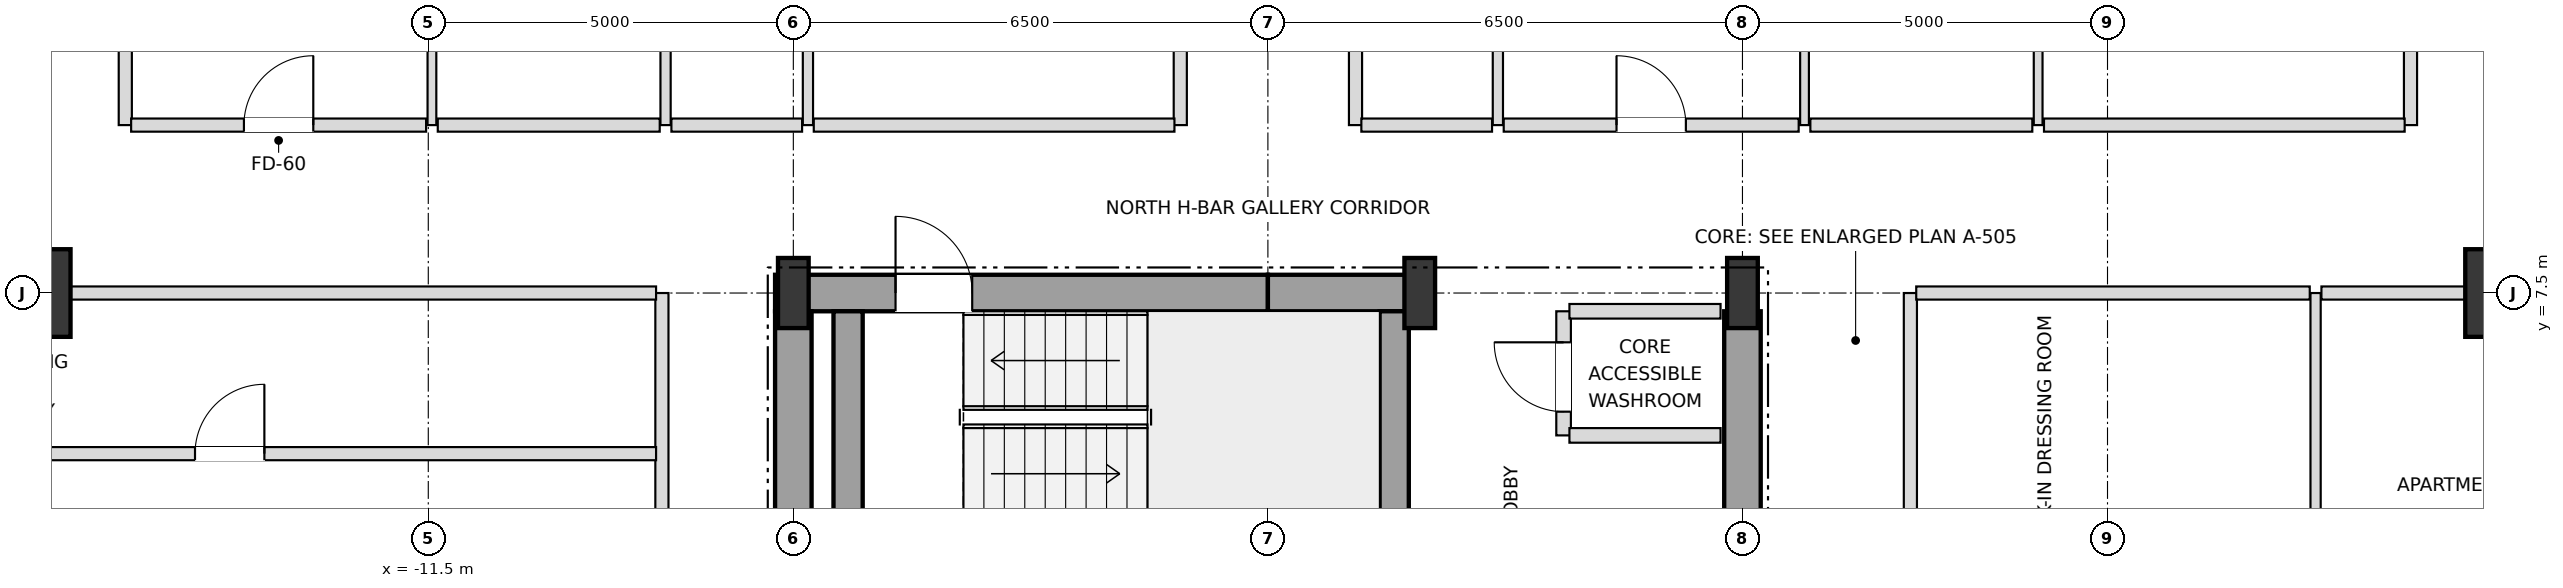
"""IFC4 building model, lengths in metres.
Left out: names, types, materials, properties, quantities, classifications, styles, units other than length and angle.
Written with IfcOpenShell. Run it as: python <this file> out.ifc"""

import sys

from ifc_helpers import new_model, si_unit, direction, frame, frame_2d, origin, origin_2d, place, context, subcontext, project, spatial, rectangle, i_section, extrude, element, fill, save


model = new_model("IFC4")
c1 = context("Model", 3, precision=1e-05, world=origin(), true_north=direction((0.0, 1.0)))
c2 = subcontext(c1, "Body", "Model", "MODEL_VIEW")
j1 = project(units=[si_unit("LENGTHUNIT", "METRE"), si_unit("PLANEANGLEUNIT", "RADIAN")], contexts=[c1])
p1 = place(None, origin())
s1 = spatial("IfcSite", under=j1, at=p1, CompositionType="ELEMENT")
p2 = place(p1, origin())
s2 = spatial("IfcBuilding", under=s1, at=p2, CompositionType="ELEMENT")
p3 = place(p2, frame((0.0, 0.0, 147.6)))
s3 = spatial("IfcBuildingStorey", under=s2, at=p3, CompositionType="ELEMENT", Elevation=147.6)
for number, where, z_axis, x_axis in (
    (1, (-6.5, 7.5, 0.0), (0.0, 0.0, 1.0), (1.0, 0.0, 0.0)),
    (2, (2.08, 7.5, 0.0), (0.0, 0.0, 1.0), (1.0, 0.0, 0.0)),
    (3, (6.5, 7.5, 0.0), (0.0, 0.0, 1.0), (1.0, 0.0, 0.0)),
):
    element("IfcColumn", number, at=place(p3, frame(where, z_axis=z_axis, x_axis=x_axis)), inside=s3, PredefinedType="COLUMN", context=c2, shape_type="SweptSolid", body=[
        extrude(i_section(OverallWidth=0.42, OverallDepth=0.96, WebThickness=0.022, FlangeThickness=0.034, at=origin_2d()), origin(), (0.0, 0.0, 1.0), 3.6),
    ])
for number, where, z_axis, x_axis in (
    (4, (17.0, 7.5, 0.0), (0.0, 0.0, 1.0), (1.0, 0.0, 0.0)),
    (5, (-17.0, 7.5, 0.0), (0.0, 0.0, 1.0), (1.0, 0.0, 0.0)),
):
    element("IfcColumn", number, at=place(p3, frame(where, z_axis=z_axis, x_axis=x_axis)), inside=s3, PredefinedType="USERDEFINED", context=c2, shape_type="SweptSolid", body=[
        extrude(rectangle(XDim=1.2, YDim=1.2, at=origin_2d()), origin(), (0.0, 0.0, 1.0), 3.6),
    ])
p4 = place(p3, frame((-6.75, 7.5, 0.0), z_axis=(0.0, 0.0, 1.0), x_axis=(1.0, 0.0, 0.0)))
e6 = element("IfcWall", 6, at=p4, inside=s3, PredefinedType="SHEAR", context=c2, shape_type="SweptSolid", body=[
    extrude(rectangle(XDim=6.75, YDim=0.5, at=frame_2d((3.375, 0.0))), origin(), (0.0, 0.0, 1.0), 3.38),
])
p5 = place(p4, frame((1.65, 0.0, 0.0)))
e7 = element("IfcOpeningElement", 7, at=p5, cuts=e6, PredefinedType="OPENING", context=c2, shape_type="SweptSolid", body=[
    extrude(rectangle(XDim=1.05, YDim=2.15, at=frame_2d((0.525, 1.075))), frame((0.0, 0.26, 0.0), z_axis=(0.0, -1.0, 0.0), x_axis=(1.0, 0.0, 0.0)), (0.0, 0.0, 1.0), 0.52),
])
p6 = place(p3, frame((0.0, 7.5, 0.0), z_axis=(0.0, 0.0, 1.0), x_axis=(1.0, 0.0, 0.0)))
e8 = element("IfcWall", 8, at=p6, inside=s3, PredefinedType="SHEAR", context=c2, shape_type="SweptSolid", body=[
    extrude(rectangle(XDim=2.08, YDim=0.5, at=frame_2d((1.04, 0.0))), origin(), (0.0, 0.0, 1.0), 3.38),
])
for number, where, z_axis, x_axis in (
    (9, (-6.5, 3.95, 0.0), (0.0, 0.0, 1.0), (0.0, 1.0, 0.0)),
    (10, (6.5, 3.95, 0.0), (0.0, 0.0, 1.0), (0.0, 1.0, 0.0)),
):
    element("IfcWall", number, at=place(p3, frame(where, z_axis=z_axis, x_axis=x_axis)), inside=s3, PredefinedType="SHEAR", context=c2, shape_type="SweptSolid", body=[
        extrude(rectangle(XDim=3.3, YDim=0.5, at=frame_2d((1.65, 0.0))), origin(), (0.0, 0.0, 1.0), 3.38),
    ])
for number, where, z_axis, x_axis in (
    (11, (1.73, 3.95, 0.0), (0.0, 0.0, 1.0), (0.0, 1.0, 0.0)),
    (12, (-5.75, 3.95, 0.0), (0.0, 0.0, 1.0), (0.0, 1.0, 0.0)),
):
    element("IfcWall", number, at=place(p3, frame(where, z_axis=z_axis, x_axis=x_axis)), inside=s3, PredefinedType="SHEAR", context=c2, shape_type="SweptSolid", body=[
        extrude(rectangle(XDim=3.3, YDim=0.4, at=frame_2d((1.65, 0.0))), origin(), (0.0, 0.0, 1.0), 3.38),
    ])
p7 = place(p3, frame((-15.65, 9.8, 0.0), z_axis=(0.0, 0.0, 1.0), x_axis=(0.0, 1.0, 0.0)))
e13 = element("IfcWall", 13, at=p7, inside=s3, PredefinedType="PARTITIONING", context=c2, shape_type="SweptSolid", body=[
    extrude(rectangle(XDim=7.35, YDim=0.18, at=frame_2d((3.675, 0.0))), origin(), (0.0, 0.0, 1.0), 2.736),
])
p8 = place(p3, frame((-11.45, 9.8, 0.0), z_axis=(0.0, 0.0, 1.0), x_axis=(0.0, 1.0, 0.0)))
e14 = element("IfcWall", 14, at=p8, inside=s3, PredefinedType="PARTITIONING", context=c2, shape_type="SweptSolid", body=[
    extrude(rectangle(XDim=7.35, YDim=0.12, at=frame_2d((3.675, 0.0))), origin(), (0.0, 0.0, 1.0), 2.736),
])
p9 = place(p8, frame((3.713, 0.0, 0.0)))
e15 = element("IfcOpeningElement", 15, at=p9, cuts=e14, PredefinedType="OPENING", context=c2, shape_type="SweptSolid", body=[
    extrude(rectangle(XDim=0.95, YDim=2.1, at=frame_2d((0.475, 1.05))), frame((0.0, 0.07, 0.0), z_axis=(0.0, -1.0, 0.0), x_axis=(1.0, 0.0, 0.0)), (0.0, 0.0, 1.0), 0.14),
])
p10 = place(p3, frame((-8.3, -7.5, 0.0), z_axis=(0.0, 0.0, 1.0), x_axis=(0.0, 1.0, 0.0)))
e16 = element("IfcWall", 16, at=p10, inside=s3, PredefinedType="PARTITIONING", context=c2, shape_type="SweptSolid", body=[
    extrude(rectangle(XDim=15.0, YDim=0.18, at=frame_2d((7.5, 0.0))), origin(), (0.0, 0.0, 1.0), 3.38),
])
p11 = place(p10, frame((1.525, 0.0, 0.0)))
e17 = element("IfcOpeningElement", 17, at=p11, cuts=e16, PredefinedType="OPENING", context=c2, shape_type="SweptSolid", body=[
    extrude(rectangle(XDim=0.95, YDim=2.15, at=frame_2d((0.475, 1.075))), frame((0.0, 0.1, 0.0), z_axis=(0.0, -1.0, 0.0), x_axis=(1.0, 0.0, 0.0)), (0.0, 0.0, 1.0), 0.2),
])
p12 = place(p3, frame((-8.25, 9.8, 0.0), z_axis=(0.0, 0.0, 1.0), x_axis=(0.0, 1.0, 0.0)))
e18 = element("IfcWall", 18, at=p12, inside=s3, PredefinedType="PARTITIONING", context=c2, shape_type="SweptSolid", body=[
    extrude(rectangle(XDim=7.35, YDim=0.14, at=frame_2d((3.675, 0.0))), origin(), (0.0, 0.0, 1.0), 2.816),
])
p13 = place(p12, frame((3.22, 0.0, 0.0)))
e19 = element("IfcOpeningElement", 19, at=p13, cuts=e18, PredefinedType="OPENING", context=c2, shape_type="SweptSolid", body=[
    extrude(rectangle(XDim=0.9, YDim=2.1, at=frame_2d((0.45, 1.05))), frame((0.0, 0.08, 0.0), z_axis=(0.0, -1.0, 0.0), x_axis=(1.0, 0.0, 0.0)), (0.0, 0.0, 1.0), 0.16),
])
p14 = place(p3, frame((-6.3, 9.8, 0.0), z_axis=(0.0, 0.0, 1.0), x_axis=(0.0, 1.0, 0.0)))
e20 = element("IfcWall", 20, at=p14, inside=s3, PredefinedType="PARTITIONING", context=c2, shape_type="SweptSolid", body=[
    extrude(rectangle(XDim=13.35, YDim=0.14, at=frame_2d((6.675, 0.0))), origin(), (0.0, 0.0, 1.0), 2.816),
])
p15 = place(p14, frame((11.051, 0.0, 0.0)))
e21 = element("IfcOpeningElement", 21, at=p15, cuts=e20, PredefinedType="OPENING", context=c2, shape_type="SweptSolid", body=[
    extrude(rectangle(XDim=0.9, YDim=2.1, at=frame_2d((0.45, 1.05))), frame((0.0, 0.08, 0.0), z_axis=(0.0, -1.0, 0.0), x_axis=(1.0, 0.0, 0.0)), (0.0, 0.0, 1.0), 0.16),
])
for number, where, z_axis, x_axis in (
    (22, (-1.2, 9.8, 0.0), (0.0, 0.0, 1.0), (0.0, 1.0, 0.0)),
    (23, (1.2, 9.8, 0.0), (0.0, 0.0, 1.0), (0.0, 1.0, 0.0)),
):
    element("IfcWall", number, at=place(p3, frame(where, z_axis=z_axis, x_axis=x_axis)), inside=s3, PredefinedType="PARTITIONING", context=c2, shape_type="SweptSolid", body=[
        extrude(rectangle(XDim=13.35, YDim=0.18, at=frame_2d((6.675, 0.0))), origin(), (0.0, 0.0, 1.0), 2.816),
    ])
p16 = place(p3, frame((3.15, 9.8, 0.0), z_axis=(0.0, 0.0, 1.0), x_axis=(0.0, 1.0, 0.0)))
e24 = element("IfcWall", 24, at=p16, inside=s3, PredefinedType="PARTITIONING", context=c2, shape_type="SweptSolid", body=[
    extrude(rectangle(XDim=7.35, YDim=0.14, at=frame_2d((3.675, 0.0))), origin(), (0.0, 0.0, 1.0), 3.38),
])
p17 = place(p16, frame((3.22, 0.0, 0.0)))
e25 = element("IfcOpeningElement", 25, at=p17, cuts=e24, PredefinedType="OPENING", context=c2, shape_type="SweptSolid", body=[
    extrude(rectangle(XDim=0.9, YDim=2.1, at=frame_2d((0.45, 1.05))), frame((0.0, 0.08, 0.0), z_axis=(0.0, -1.0, 0.0), x_axis=(1.0, 0.0, 0.0)), (0.0, 0.0, 1.0), 0.16),
])
p18 = place(p3, frame((4.05, 5.55, 0.0), z_axis=(0.0, 0.0, 1.0), x_axis=(0.0, 1.0, 0.0)))
e26 = element("IfcWall", 26, at=p18, inside=s3, PredefinedType="SOLIDWALL", context=c2, shape_type="SweptSolid", body=[
    extrude(rectangle(XDim=1.7, YDim=0.2, at=frame_2d((0.85, 0.0))), origin(), (0.0, 0.0, 1.0), 3.38),
])
p19 = place(p18, frame((0.325, 0.0, 0.0)))
e27 = element("IfcOpeningElement", 27, at=p19, cuts=e26, PredefinedType="OPENING", context=c2, shape_type="SweptSolid", body=[
    extrude(rectangle(XDim=0.95, YDim=2.15, at=frame_2d((0.475, 1.075))), frame((0.0, 0.11, 0.0), z_axis=(0.0, -1.0, 0.0), x_axis=(1.0, 0.0, 0.0)), (0.0, 0.0, 1.0), 0.22),
])
p20 = place(p3, frame((7.35, 9.8, 0.0), z_axis=(0.0, 0.0, 1.0), x_axis=(0.0, 1.0, 0.0)))
e28 = element("IfcWall", 28, at=p20, inside=s3, PredefinedType="PARTITIONING", context=c2, shape_type="SweptSolid", body=[
    extrude(rectangle(XDim=7.35, YDim=0.12, at=frame_2d((3.675, 0.0))), origin(), (0.0, 0.0, 1.0), 2.816),
])
p21 = place(p20, frame((3.195, 0.0, 0.0)))
e29 = element("IfcOpeningElement", 29, at=p21, cuts=e28, PredefinedType="OPENING", context=c2, shape_type="SweptSolid", body=[
    extrude(rectangle(XDim=0.95, YDim=2.1, at=frame_2d((0.475, 1.05))), frame((0.0, 0.07, 0.0), z_axis=(0.0, -1.0, 0.0), x_axis=(1.0, 0.0, 0.0)), (0.0, 0.0, 1.0), 0.14),
])
p22 = place(p3, frame((8.8, -7.5, 0.0), z_axis=(0.0, 0.0, 1.0), x_axis=(0.0, 1.0, 0.0)))
e30 = element("IfcWall", 30, at=p22, inside=s3, PredefinedType="PARTITIONING", context=c2, shape_type="SweptSolid", body=[
    extrude(rectangle(XDim=15.0, YDim=0.18, at=frame_2d((7.5, 0.0))), origin(), (0.0, 0.0, 1.0), 3.38),
])
p23 = place(p22, frame((3.475, 0.0, 0.0)))
e31 = element("IfcOpeningElement", 31, at=p23, cuts=e30, PredefinedType="OPENING", context=c2, shape_type="SweptSolid", body=[
    extrude(rectangle(XDim=0.95, YDim=2.15, at=frame_2d((0.475, 1.075))), frame((0.0, 0.1, 0.0), z_axis=(0.0, -1.0, 0.0), x_axis=(1.0, 0.0, 0.0)), (0.0, 0.0, 1.0), 0.2),
])
p24 = place(p3, frame((10.55, 9.8, 0.0), z_axis=(0.0, 0.0, 1.0), x_axis=(0.0, 1.0, 0.0)))
e32 = element("IfcWall", 32, at=p24, inside=s3, PredefinedType="PARTITIONING", context=c2, shape_type="SweptSolid", body=[
    extrude(rectangle(XDim=13.35, YDim=0.12, at=frame_2d((6.675, 0.0))), origin(), (0.0, 0.0, 1.0), 2.816),
])
p25 = place(p24, frame((3.713, 0.0, 0.0)))
e33 = element("IfcOpeningElement", 33, at=p25, cuts=e32, PredefinedType="OPENING", context=c2, shape_type="SweptSolid", body=[
    extrude(rectangle(XDim=0.95, YDim=2.1, at=frame_2d((0.475, 1.05))), frame((0.0, 0.07, 0.0), z_axis=(0.0, -1.0, 0.0), x_axis=(1.0, 0.0, 0.0)), (0.0, 0.0, 1.0), 0.14),
])
p26 = place(p24, frame((11.051, 0.0, 0.0)))
e34 = element("IfcOpeningElement", 34, at=p26, cuts=e32, PredefinedType="OPENING", context=c2, shape_type="SweptSolid", body=[
    extrude(rectangle(XDim=0.9, YDim=2.1, at=frame_2d((0.45, 1.05))), frame((0.0, 0.07, 0.0), z_axis=(0.0, -1.0, 0.0), x_axis=(1.0, 0.0, 0.0)), (0.0, 0.0, 1.0), 0.14),
])
p27 = place(p3, frame((14.35, -7.5, 0.0), z_axis=(0.0, 0.0, 1.0), x_axis=(0.0, 1.0, 0.0)))
e35 = element("IfcWall", 35, at=p27, inside=s3, PredefinedType="PARTITIONING", context=c2, shape_type="SweptSolid", body=[
    extrude(rectangle(XDim=15.0, YDim=0.14, at=frame_2d((7.5, 0.0))), origin(), (0.0, 0.0, 1.0), 3.38),
])
p28 = place(p27, frame((3.475, 0.0, 0.0)))
e36 = element("IfcOpeningElement", 36, at=p28, cuts=e35, PredefinedType="OPENING", context=c2, shape_type="SweptSolid", body=[
    extrude(rectangle(XDim=0.95, YDim=2.1, at=frame_2d((0.475, 1.05))), frame((0.0, 0.08, 0.0), z_axis=(0.0, -1.0, 0.0), x_axis=(1.0, 0.0, 0.0)), (0.0, 0.0, 1.0), 0.16),
])
p29 = place(p3, frame((15.65, 9.8, 0.0), z_axis=(0.0, 0.0, 1.0), x_axis=(0.0, 1.0, 0.0)))
e37 = element("IfcWall", 37, at=p29, inside=s3, PredefinedType="PARTITIONING", context=c2, shape_type="SweptSolid", body=[
    extrude(rectangle(XDim=7.35, YDim=0.18, at=frame_2d((3.675, 0.0))), origin(), (0.0, 0.0, 1.0), 2.736),
])
p30 = place(p3, frame((-20.07, 5.3, 0.0), z_axis=(0.0, 0.0, 1.0), x_axis=(1.0, 0.0, 0.0)))
e38 = element("IfcWall", 38, at=p30, inside=s3, PredefinedType="PARTITIONING", context=c2, shape_type="SweptSolid", body=[
    extrude(rectangle(XDim=11.69, YDim=0.18, at=frame_2d((5.845, 0.0))), origin(), (0.0, 0.0, 1.0), 2.816),
])
p31 = place(p30, frame((5.375, 0.0, 0.0)))
e39 = element("IfcOpeningElement", 39, at=p31, cuts=e38, PredefinedType="OPENING", context=c2, shape_type="SweptSolid", body=[
    extrude(rectangle(XDim=0.95, YDim=2.15, at=frame_2d((0.475, 1.075))), frame((0.0, 0.1, 0.0), z_axis=(0.0, -1.0, 0.0), x_axis=(1.0, 0.0, 0.0)), (0.0, 0.0, 1.0), 0.2),
])
for number, where, z_axis, x_axis in (
    (40, (4.13, 5.55, 0.0), (0.0, 0.0, 1.0), (1.0, 0.0, 0.0)),
    (41, (4.13, 7.25, 0.0), (0.0, 0.0, 1.0), (1.0, 0.0, 0.0)),
):
    element("IfcWall", number, at=place(p3, frame(where, z_axis=z_axis, x_axis=x_axis)), inside=s3, PredefinedType="SOLIDWALL", context=c2, shape_type="SweptSolid", body=[
        extrude(rectangle(XDim=2.07, YDim=0.2, at=frame_2d((1.035, 0.0))), origin(), (0.0, 0.0, 1.0), 3.38),
    ])
p32 = place(p3, frame((-20.15, 7.5, 0.0), z_axis=(0.0, 0.0, 1.0), x_axis=(1.0, 0.0, 0.0)))
e42 = element("IfcWall", 42, at=p32, inside=s3, PredefinedType="PARTITIONING", context=c2, shape_type="SweptSolid", body=[
    extrude(rectangle(XDim=11.77, YDim=0.18, at=frame_2d((5.885, 0.0))), origin(), (0.0, 0.0, 1.0), 2.816),
])
p33 = place(p3, frame((8.88, 7.5, 0.0), z_axis=(0.0, 0.0, 1.0), x_axis=(1.0, 0.0, 0.0)))
e43 = element("IfcWall", 43, at=p33, inside=s3, PredefinedType="PARTITIONING", context=c2, shape_type="SweptSolid", body=[
    extrude(rectangle(XDim=5.39, YDim=0.18, at=frame_2d((2.695, 0.0))), origin(), (0.0, 0.0, 1.0), 2.816),
])
p34 = place(p3, frame((14.43, 7.5, 0.0), z_axis=(0.0, 0.0, 1.0), x_axis=(1.0, 0.0, 0.0)))
e44 = element("IfcWall", 44, at=p34, inside=s3, PredefinedType="PARTITIONING", context=c2, shape_type="SweptSolid", body=[
    extrude(rectangle(XDim=5.72, YDim=0.18, at=frame_2d((2.86, 0.0))), origin(), (0.0, 0.0, 1.0), 2.816),
])
p35 = place(p3, frame((-15.57, 9.8, 0.0), z_axis=(0.0, 0.0, 1.0), x_axis=(1.0, 0.0, 0.0)))
e45 = element("IfcWall", 45, at=p35, inside=s3, PredefinedType="PARTITIONING", context=c2, shape_type="SweptSolid", body=[
    extrude(rectangle(XDim=4.04, YDim=0.18, at=frame_2d((2.02, 0.0))), origin(), (0.0, 0.0, 1.0), 3.38),
])
p36 = place(p35, frame((1.545, 0.0, 0.0)))
e46 = element("IfcOpeningElement", 46, at=p36, cuts=e45, PredefinedType="OPENING", context=c2, shape_type="SweptSolid", body=[
    extrude(rectangle(XDim=0.95, YDim=2.15, at=frame_2d((0.475, 1.075))), frame((0.0, 0.1, 0.0), z_axis=(0.0, -1.0, 0.0), x_axis=(1.0, 0.0, 0.0)), (0.0, 0.0, 1.0), 0.2),
])
p37 = place(p3, frame((-11.37, 9.8, 0.0), z_axis=(0.0, 0.0, 1.0), x_axis=(1.0, 0.0, 0.0)))
e47 = element("IfcWall", 47, at=p37, inside=s3, PredefinedType="PARTITIONING", context=c2, shape_type="SweptSolid", body=[
    extrude(rectangle(XDim=3.04, YDim=0.18, at=frame_2d((1.52, 0.0))), origin(), (0.0, 0.0, 1.0), 3.38),
])
p38 = place(p3, frame((-8.17, 9.8, 0.0), z_axis=(0.0, 0.0, 1.0), x_axis=(1.0, 0.0, 0.0)))
e48 = element("IfcWall", 48, at=p38, inside=s3, PredefinedType="PARTITIONING", context=c2, shape_type="SweptSolid", body=[
    extrude(rectangle(XDim=1.79, YDim=0.18, at=frame_2d((0.895, 0.0))), origin(), (0.0, 0.0, 1.0), 2.816),
])
p39 = place(p3, frame((-6.22, 9.8, 0.0), z_axis=(0.0, 0.0, 1.0), x_axis=(1.0, 0.0, 0.0)))
e49 = element("IfcWall", 49, at=p39, inside=s3, PredefinedType="PARTITIONING", context=c2, shape_type="SweptSolid", body=[
    extrude(rectangle(XDim=4.94, YDim=0.18, at=frame_2d((2.47, 0.0))), origin(), (0.0, 0.0, 1.0), 3.38),
])
p40 = place(p3, frame((1.28, 9.8, 0.0), z_axis=(0.0, 0.0, 1.0), x_axis=(1.0, 0.0, 0.0)))
e50 = element("IfcWall", 50, at=p40, inside=s3, PredefinedType="PARTITIONING", context=c2, shape_type="SweptSolid", body=[
    extrude(rectangle(XDim=1.79, YDim=0.18, at=frame_2d((0.895, 0.0))), origin(), (0.0, 0.0, 1.0), 3.38),
])
p41 = place(p3, frame((3.23, 9.8, 0.0), z_axis=(0.0, 0.0, 1.0), x_axis=(1.0, 0.0, 0.0)))
e51 = element("IfcWall", 51, at=p41, inside=s3, PredefinedType="PARTITIONING", context=c2, shape_type="SweptSolid", body=[
    extrude(rectangle(XDim=4.04, YDim=0.18, at=frame_2d((2.02, 0.0))), origin(), (0.0, 0.0, 1.0), 2.816),
])
p42 = place(p41, frame((1.545, 0.0, 0.0)))
e52 = element("IfcOpeningElement", 52, at=p42, cuts=e51, PredefinedType="OPENING", context=c2, shape_type="SweptSolid", body=[
    extrude(rectangle(XDim=0.95, YDim=2.15, at=frame_2d((0.475, 1.075))), frame((0.0, 0.1, 0.0), z_axis=(0.0, -1.0, 0.0), x_axis=(1.0, 0.0, 0.0)), (0.0, 0.0, 1.0), 0.2),
])
p43 = place(p3, frame((7.43, 9.8, 0.0), z_axis=(0.0, 0.0, 1.0), x_axis=(1.0, 0.0, 0.0)))
e53 = element("IfcWall", 53, at=p43, inside=s3, PredefinedType="PARTITIONING", context=c2, shape_type="SweptSolid", body=[
    extrude(rectangle(XDim=3.04, YDim=0.18, at=frame_2d((1.52, 0.0))), origin(), (0.0, 0.0, 1.0), 3.38),
])
p44 = place(p3, frame((10.63, 9.8, 0.0), z_axis=(0.0, 0.0, 1.0), x_axis=(1.0, 0.0, 0.0)))
e54 = element("IfcWall", 54, at=p44, inside=s3, PredefinedType="PARTITIONING", context=c2, shape_type="SweptSolid", body=[
    extrude(rectangle(XDim=4.94, YDim=0.18, at=frame_2d((2.47, 0.0))), origin(), (0.0, 0.0, 1.0), 3.38),
])
p45 = place(p5, origin())
e55 = element("IfcDoor", 55, at=p45, inside=s3, OperationType="SINGLE_SWING_LEFT", PredefinedType="DOOR", context=c2, shape_type="SweptSolid", body=[
    extrude(rectangle(XDim=1.05, YDim=2.15, at=frame_2d((0.525, 1.075))), frame((0.0, 0.025, 0.0), z_axis=(0.0, -1.0, 0.0), x_axis=(1.0, 0.0, 0.0)), (0.0, 0.0, 1.0), 0.05),
])
fill(e7, e55)
p46 = place(p19, origin())
e56 = element("IfcDoor", 56, at=p46, inside=s3, OperationType="SINGLE_SWING_RIGHT", PredefinedType="DOOR", context=c2, shape_type="SweptSolid", body=[
    extrude(rectangle(XDim=0.95, YDim=2.15, at=frame_2d((0.475, 1.075))), frame((0.0, 0.025, 0.0), z_axis=(0.0, -1.0, 0.0), x_axis=(1.0, 0.0, 0.0)), (0.0, 0.0, 1.0), 0.05),
])
fill(e27, e56)
p47 = place(p36, origin())
e57 = element("IfcDoor", 57, at=p47, inside=s3, OperationType="SINGLE_SWING_RIGHT", PredefinedType="DOOR", context=c2, shape_type="SweptSolid", body=[
    extrude(rectangle(XDim=0.95, YDim=2.15, at=frame_2d((0.475, 1.075))), frame((0.0, 0.025, 0.0), z_axis=(0.0, -1.0, 0.0), x_axis=(1.0, 0.0, 0.0)), (0.0, 0.0, 1.0), 0.05),
])
fill(e46, e57)
p48 = place(p42, origin())
e58 = element("IfcDoor", 58, at=p48, inside=s3, OperationType="SINGLE_SWING_LEFT", PredefinedType="DOOR", context=c2, shape_type="SweptSolid", body=[
    extrude(rectangle(XDim=0.95, YDim=2.15, at=frame_2d((0.475, 1.075))), frame((0.0, 0.025, 0.0), z_axis=(0.0, -1.0, 0.0), x_axis=(1.0, 0.0, 0.0)), (0.0, 0.0, 1.0), 0.05),
])
fill(e52, e58)
p49 = place(p31, origin())
e59 = element("IfcDoor", 59, at=p49, inside=s3, OperationType="SINGLE_SWING_RIGHT", PredefinedType="DOOR", context=c2, shape_type="SweptSolid", body=[
    extrude(rectangle(XDim=0.95, YDim=2.15, at=frame_2d((0.475, 1.075))), frame((0.0, 0.025, 0.0), z_axis=(0.0, -1.0, 0.0), x_axis=(1.0, 0.0, 0.0)), (0.0, 0.0, 1.0), 0.05),
])
fill(e39, e59)
save(model, sys.argv[1])
